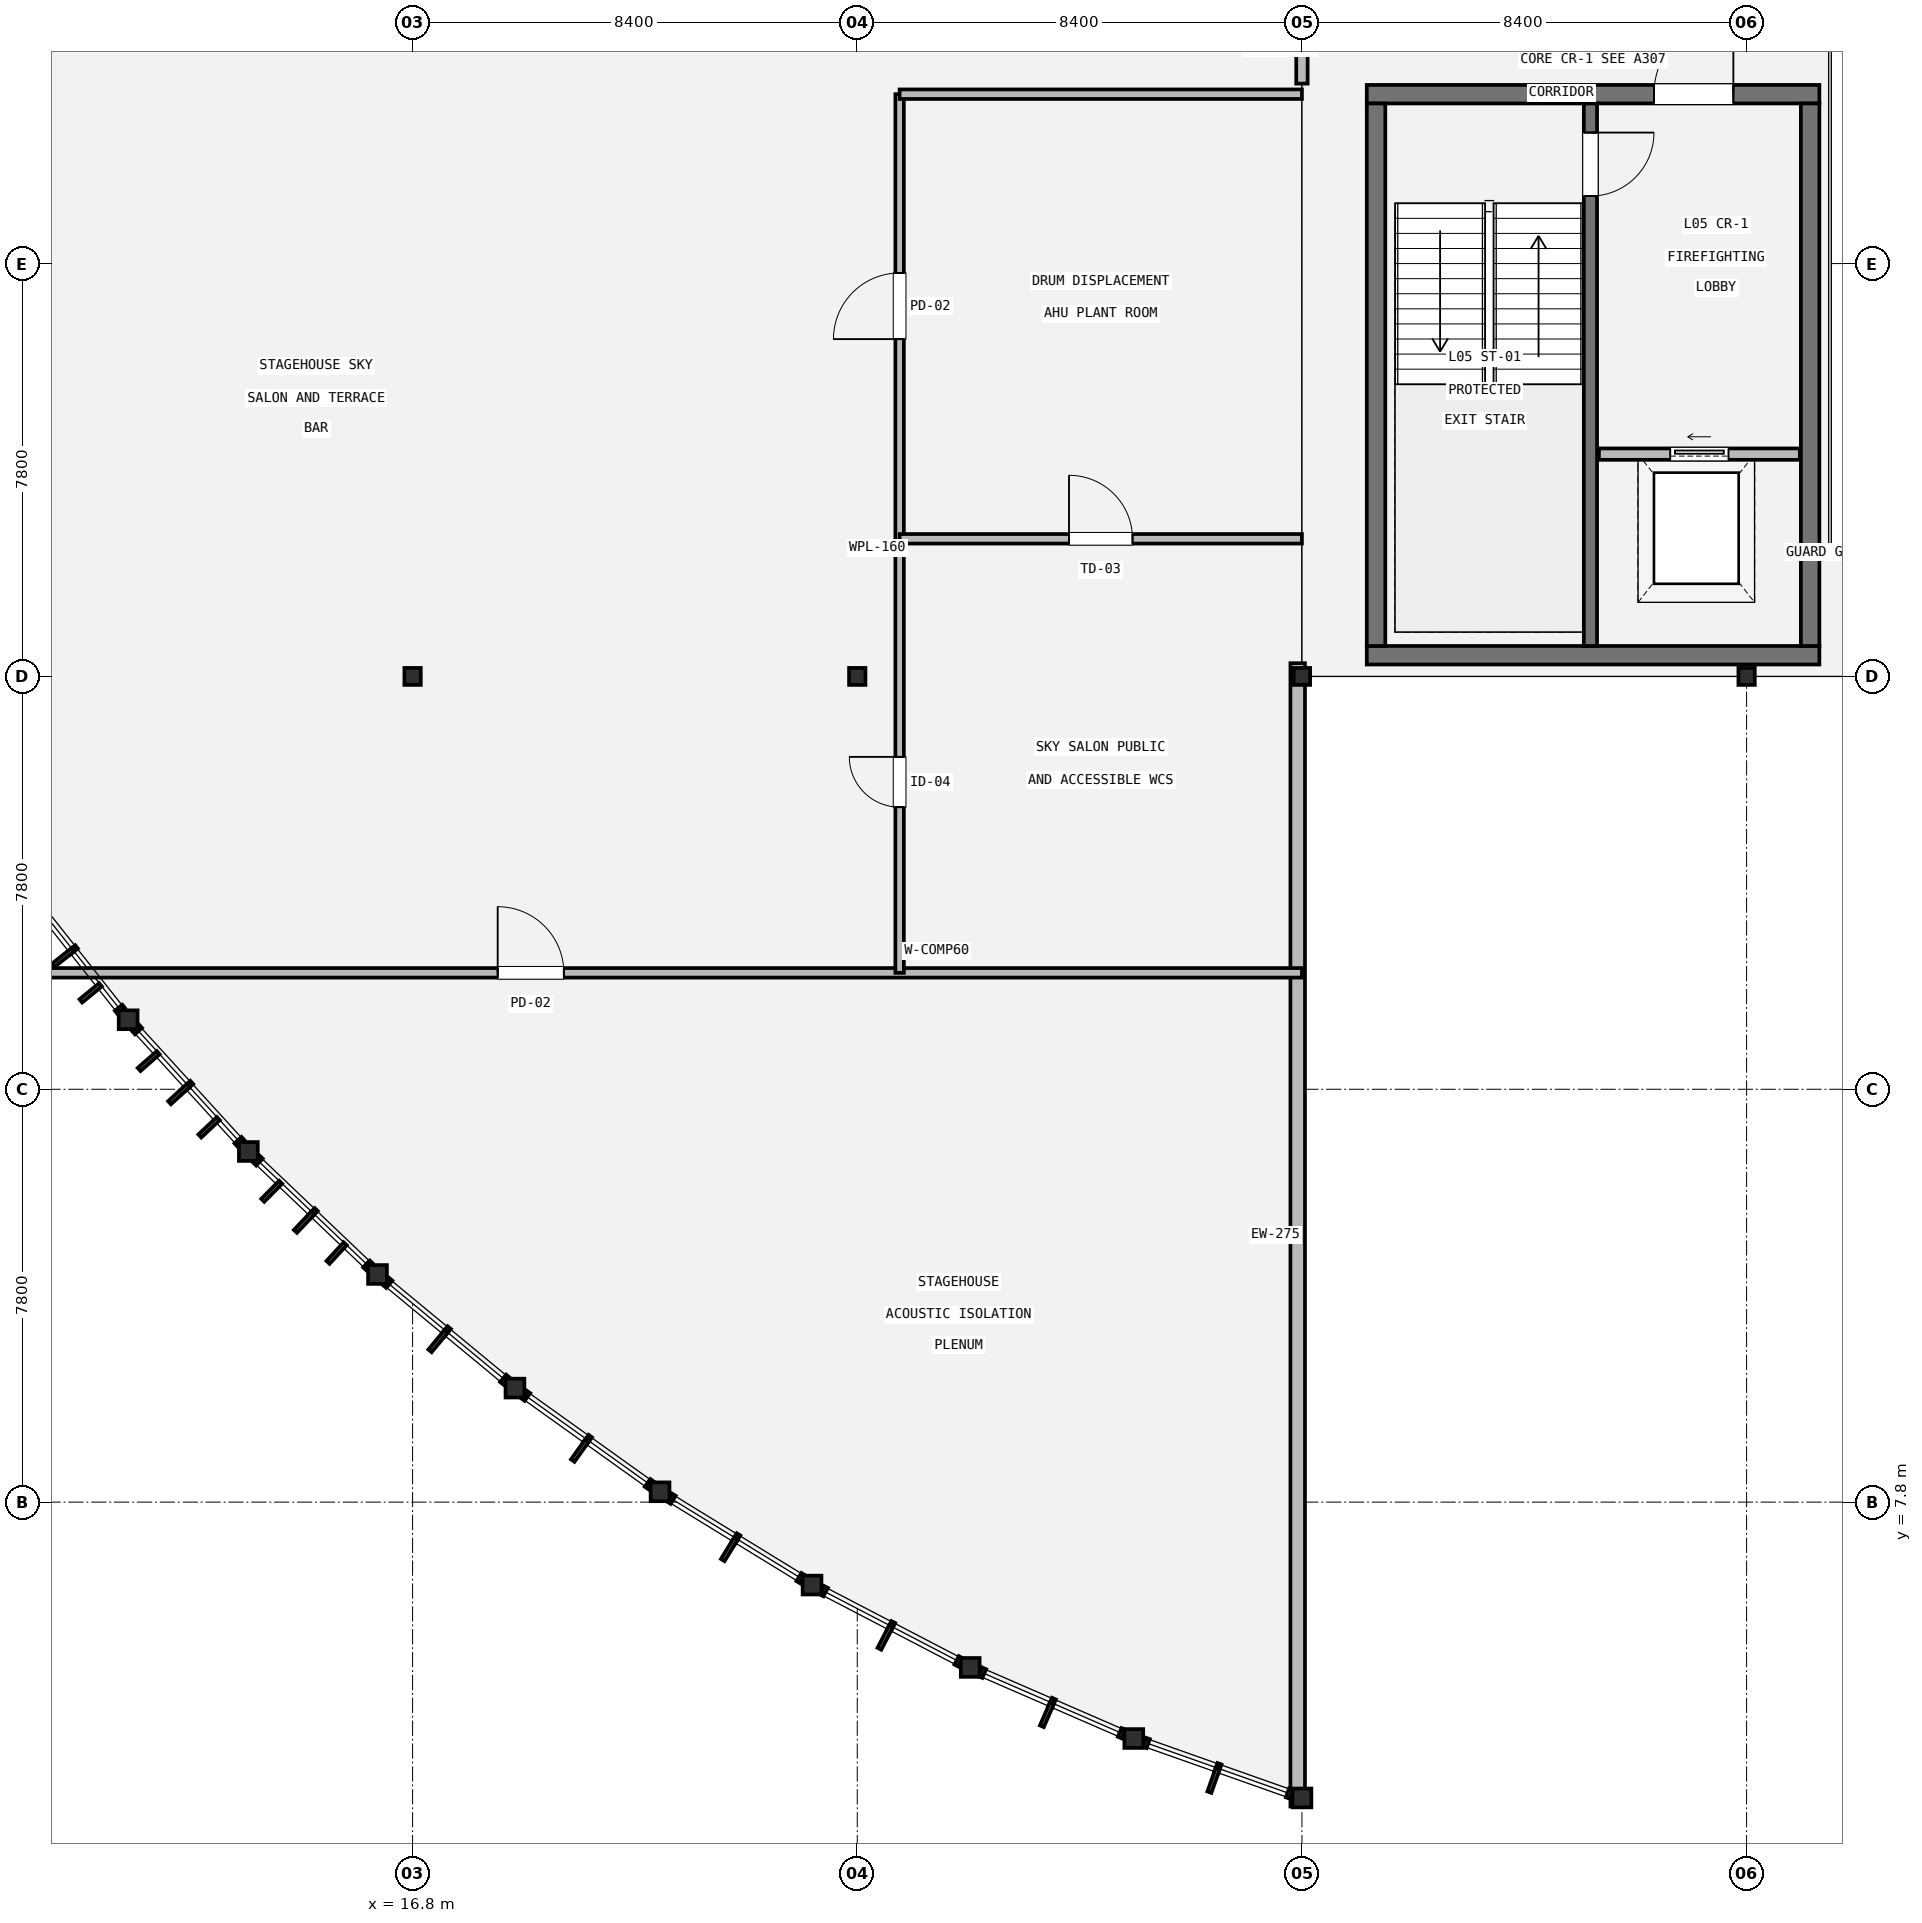
"""IFC4 building model, lengths in metres.
Left out: names, types, materials, properties, quantities, classifications, styles, units other than length and angle.
Written with IfcOpenShell. Run it as: python <this file> out.ifc"""

import sys

from ifc_helpers import new_model, si_unit, direction, frame, frame_2d, origin, origin_2d, place, context, subcontext, project, spatial, rectangle, hollow_circle, i_section, extrude, element, fill, save


model = new_model("IFC4")
c1 = context("Model", 3, precision=1e-05, world=origin(), true_north=direction((0.0, 1.0)))
c2 = subcontext(c1, "Body", "Model", "MODEL_VIEW")
j1 = project(units=[si_unit("LENGTHUNIT", "METRE"), si_unit("PLANEANGLEUNIT", "RADIAN")], contexts=[c1])
p1 = place(None, origin())
s1 = spatial("IfcSite", under=j1, at=p1, CompositionType="ELEMENT")
p2 = place(p1, origin())
s2 = spatial("IfcBuilding", under=s1, at=p2, CompositionType="ELEMENT")
p3 = place(p2, frame((0.0, 0.0, 23.4)))
s3 = spatial("IfcBuildingStorey", under=s2, at=p3, CompositionType="ELEMENT", Elevation=23.4)
for number, where, z_axis, x_axis in (
    (1, (16.8, 23.4, 0.0), (0.0, 0.0, 1.0), (1.0, 0.0, 0.0)),
    (2, (25.2, 23.4, 0.0), (0.0, 0.0, 1.0), (1.0, 0.0, 0.0)),
    (3, (33.6, 23.4, 0.0), (0.0, 0.0, 1.0), (1.0, 0.0, 0.0)),
    (4, (42.0, 23.4, 0.0), (0.0, 0.0, 1.0), (1.0, 0.0, 0.0)),
):
    element("IfcColumn", number, at=place(p3, frame(where, z_axis=z_axis, x_axis=x_axis)), inside=s3, PredefinedType="COLUMN", context=c2, shape_type="SweptSolid", body=[
        extrude(i_section(OverallWidth=0.309, OverallDepth=0.321, WebThickness=0.014, FlangeThickness=0.022, FilletRadius=0.015, at=origin_2d()), origin(), (0.0, 0.0, 1.0), 4.2),
    ])
for number, where, z_axis, x_axis in (
    (5, (11.427, 16.913, 0.0), (0.0, 0.0, 1.0), (1.0, 0.0, 0.0)),
    (6, (13.698, 14.424, 0.0), (0.0, 0.0, 1.0), (1.0, 0.0, 0.0)),
    (7, (16.137, 12.101, 0.0), (0.0, 0.0, 1.0), (1.0, 0.0, 0.0)),
    (8, (18.734, 9.954, 0.0), (0.0, 0.0, 1.0), (1.0, 0.0, 0.0)),
    (9, (21.474, 7.995, 0.0), (0.0, 0.0, 1.0), (1.0, 0.0, 0.0)),
    (10, (24.346, 6.233, 0.0), (0.0, 0.0, 1.0), (1.0, 0.0, 0.0)),
    (11, (27.334, 4.677, 0.0), (0.0, 0.0, 1.0), (1.0, 0.0, 0.0)),
    (12, (30.424, 3.334, 0.0), (0.0, 0.0, 1.0), (1.0, 0.0, 0.0)),
    (13, (33.6, 2.211, 0.0), (0.0, 0.0, 1.0), (1.0, 0.0, 0.0)),
):
    element("IfcColumn", number, at=place(p3, frame(where, z_axis=z_axis, x_axis=x_axis)), inside=s3, PredefinedType="COLUMN", context=c2, shape_type="SweptSolid", body=[
        extrude(hollow_circle(Radius=0.178, WallThickness=0.016, at=origin_2d()), origin(), (0.0, 0.0, 1.0), 4.2),
    ])
p4 = place(p3, frame((33.52, 2.05, 0.0), z_axis=(0.0, 0.0, 1.0), x_axis=(0.0, 1.0, 0.0)))
e14 = element("IfcWall", 14, at=p4, inside=s3, PredefinedType="STANDARD", context=c2, shape_type="SweptSolid", body=[
    extrude(rectangle(XDim=21.6, YDim=0.275, at=frame_2d((10.8, 0.0))), origin(), (0.0, 0.0, 1.0), 3.177),
])
p5 = place(p3, frame((43.375, 23.8, 0.0), z_axis=(0.0, 0.0, 1.0), x_axis=(-1.0, 0.0, 0.0)))
e15 = element("IfcWall", 15, at=p5, inside=s3, PredefinedType="SHEAR", context=c2, shape_type="SweptSolid", body=[
    extrude(rectangle(XDim=8.55, YDim=0.35, at=frame_2d((4.275, 0.0))), origin(), (0.0, 0.0, 1.0), 3.955),
])
p6 = place(p3, frame((34.825, 34.4, 0.0), z_axis=(0.0, 0.0, 1.0), x_axis=(1.0, 0.0, 0.0)))
e16 = element("IfcWall", 16, at=p6, inside=s3, PredefinedType="SHEAR", context=c2, shape_type="SweptSolid", body=[
    extrude(rectangle(XDim=8.55, YDim=0.35, at=frame_2d((4.275, 0.0))), origin(), (0.0, 0.0, 1.0), 3.955),
])
p7 = place(p6, frame((5.425, 0.0, 0.0)))
e17 = element("IfcOpeningElement", 17, at=p7, cuts=e16, PredefinedType="OPENING", context=c2, shape_type="SweptSolid", body=[
    extrude(rectangle(XDim=1.5, YDim=2.15, at=frame_2d((0.75, 1.075))), frame((0.0, 0.185, 0.0), z_axis=(0.0, -1.0, 0.0), x_axis=(1.0, 0.0, 0.0)), (0.0, 0.0, 1.0), 0.37),
])
for number, where, z_axis, x_axis in (
    (18, (35.0, 23.975, 0.0), (0.0, 0.0, 1.0), (0.0, 1.0, 0.0)),
    (19, (43.2, 34.225, 0.0), (0.0, 0.0, 1.0), (0.0, -1.0, 0.0)),
):
    element("IfcWall", number, at=place(p3, frame(where, z_axis=z_axis, x_axis=x_axis)), inside=s3, PredefinedType="SHEAR", context=c2, shape_type="SweptSolid", body=[
        extrude(rectangle(XDim=10.25, YDim=0.35, at=frame_2d((5.125, 0.0))), origin(), (0.0, 0.0, 1.0), 3.955),
    ])
p8 = place(p3, frame((39.05, 34.225, 0.0), z_axis=(0.0, 0.0, 1.0), x_axis=(0.0, -1.0, 0.0)))
e20 = element("IfcWall", 20, at=p8, inside=s3, PredefinedType="SHEAR", context=c2, shape_type="SweptSolid", body=[
    extrude(rectangle(XDim=10.25, YDim=0.25, at=frame_2d((5.125, 0.0))), origin(), (0.0, 0.0, 1.0), 3.955),
])
p9 = place(p8, frame((0.55, 0.0, 0.0)))
e21 = element("IfcOpeningElement", 21, at=p9, cuts=e20, PredefinedType="OPENING", context=c2, shape_type="SweptSolid", body=[
    extrude(rectangle(XDim=1.2, YDim=2.15, at=frame_2d((0.6, 1.075))), frame((0.0, 0.135, 0.0), z_axis=(0.0, -1.0, 0.0), x_axis=(1.0, 0.0, 0.0)), (0.0, 0.0, 1.0), 0.27),
])
p10 = place(p3, frame((39.21, 27.6, 0.0), z_axis=(0.0, 0.0, 1.0), x_axis=(1.0, 0.0, 0.0)))
e22 = element("IfcWall", 22, at=p10, inside=s3, PredefinedType="STANDARD", context=c2, shape_type="SweptSolid", body=[
    extrude(rectangle(XDim=3.795, YDim=0.215, at=frame_2d((1.897, 0.0))), origin(), (0.0, 0.0, 1.0), 3.947),
])
p11 = place(p10, frame((1.347, 0.0, 0.0)))
e23 = element("IfcOpeningElement", 23, at=p11, cuts=e22, PredefinedType="OPENING", context=c2, shape_type="SweptSolid", body=[
    extrude(rectangle(XDim=1.1, YDim=2.2, at=frame_2d((0.55, 1.1))), frame((0.0, 0.117, 0.0), z_axis=(0.0, -1.0, 0.0), x_axis=(1.0, 0.0, 0.0)), (0.0, 0.0, 1.0), 0.235),
])
p12 = place(p3, frame((7.0, 17.8, 0.0), z_axis=(0.0, 0.0, 1.0), x_axis=(1.0, 0.0, 0.0)))
e24 = element("IfcWall", 24, at=p12, inside=s3, PredefinedType="STANDARD", context=c2, shape_type="SweptSolid", body=[
    extrude(rectangle(XDim=26.6, YDim=0.18, at=frame_2d((13.3, 0.0))), origin(), (0.0, 0.0, 1.0), 3.667),
])
p13 = place(p12, frame((11.407, 0.0, 0.0)))
e25 = element("IfcOpeningElement", 25, at=p13, cuts=e24, PredefinedType="OPENING", context=c2, shape_type="SweptSolid", body=[
    extrude(rectangle(XDim=1.25, YDim=2.15, at=frame_2d((0.625, 1.075))), frame((0.0, 0.1, 0.0), z_axis=(0.0, -1.0, 0.0), x_axis=(1.0, 0.0, 0.0)), (0.0, 0.0, 1.0), 0.2),
])
p14 = place(p3, frame((33.6, 34.6, 0.0), z_axis=(0.0, 0.0, 1.0), x_axis=(0.0, 1.0, 0.0)))
e26 = element("IfcWall", 26, at=p14, inside=s3, PredefinedType="STANDARD", context=c2, shape_type="SweptSolid", body=[
    extrude(rectangle(XDim=20.0, YDim=0.215, at=frame_2d((10.0, 0.0))), origin(), (0.0, 0.0, 1.0), 3.177),
])
p15 = place(p14, frame((1.504, 0.0, 0.0)))
e27 = element("IfcOpeningElement", 27, at=p15, cuts=e26, PredefinedType="OPENING", context=c2, shape_type="SweptSolid", body=[
    extrude(rectangle(XDim=1.2, YDim=2.15, at=frame_2d((0.6, 1.075))), frame((0.0, 0.117, 0.0), z_axis=(0.0, -1.0, 0.0), x_axis=(1.0, 0.0, 0.0)), (0.0, 0.0, 1.0), 0.235),
])
p16 = place(p14, frame((13.724, 0.0, 0.0)))
e28 = element("IfcOpeningElement", 28, at=p16, cuts=e26, PredefinedType="OPENING", context=c2, shape_type="SweptSolid", body=[
    extrude(rectangle(XDim=1.2, YDim=2.15, at=frame_2d((0.6, 1.075))), frame((0.0, 0.117, 0.0), z_axis=(0.0, -1.0, 0.0), x_axis=(1.0, 0.0, 0.0)), (0.0, 0.0, 1.0), 0.235),
])
p17 = place(p3, frame((26.0, 17.8, 0.0), z_axis=(0.0, 0.0, 1.0), x_axis=(0.0, 1.0, 0.0)))
e29 = element("IfcWall", 29, at=p17, inside=s3, PredefinedType="PLUMBINGWALL", context=c2, shape_type="SweptSolid", body=[
    extrude(rectangle(XDim=16.6, YDim=0.16, at=frame_2d((8.3, 0.0))), origin(), (0.0, 0.0, 1.0), 3.434),
])
p18 = place(p17, frame((3.13, 0.0, 0.0)))
e30 = element("IfcOpeningElement", 30, at=p18, cuts=e29, PredefinedType="OPENING", context=c2, shape_type="SweptSolid", body=[
    extrude(rectangle(XDim=0.95, YDim=2.1, at=frame_2d((0.475, 1.05))), frame((0.0, 0.09, 0.0), z_axis=(0.0, -1.0, 0.0), x_axis=(1.0, 0.0, 0.0)), (0.0, 0.0, 1.0), 0.18),
])
p19 = place(p17, frame((11.973, 0.0, 0.0)))
e31 = element("IfcOpeningElement", 31, at=p19, cuts=e29, PredefinedType="OPENING", context=c2, shape_type="SweptSolid", body=[
    extrude(rectangle(XDim=1.25, YDim=2.15, at=frame_2d((0.625, 1.075))), frame((0.0, 0.09, 0.0), z_axis=(0.0, -1.0, 0.0), x_axis=(1.0, 0.0, 0.0)), (0.0, 0.0, 1.0), 0.18),
])
p20 = place(p3, frame((26.0, 26.0, 0.0), z_axis=(0.0, 0.0, 1.0), x_axis=(1.0, 0.0, 0.0)))
e32 = element("IfcWall", 32, at=p20, inside=s3, PredefinedType="STANDARD", context=c2, shape_type="SweptSolid", body=[
    extrude(rectangle(XDim=7.6, YDim=0.18, at=frame_2d((3.8, 0.0))), origin(), (0.0, 0.0, 1.0), 3.177),
])
p21 = place(p20, frame((3.2, 0.0, 0.0)))
e33 = element("IfcOpeningElement", 33, at=p21, cuts=e32, PredefinedType="OPENING", context=c2, shape_type="SweptSolid", body=[
    extrude(rectangle(XDim=1.2, YDim=1.1, at=frame_2d((0.6, 0.55))), frame((0.0, 0.1, 0.0), z_axis=(0.0, -1.0, 0.0), x_axis=(1.0, 0.0, 0.0)), (0.0, 0.0, 1.0), 0.2),
])
p22 = place(p3, frame((26.0, 34.4, 0.0), z_axis=(0.0, 0.0, 1.0), x_axis=(1.0, 0.0, 0.0)))
e34 = element("IfcWall", 34, at=p22, inside=s3, PredefinedType="STANDARD", context=c2, shape_type="SweptSolid", body=[
    extrude(rectangle(XDim=7.6, YDim=0.18, at=frame_2d((3.8, 0.0))), origin(), (0.0, 0.0, 1.0), 3.177),
])
p23 = place(p9, origin())
e35 = element("IfcDoor", 35, at=p23, inside=s3, OperationType="SINGLE_SWING_LEFT", PredefinedType="DOOR", context=c2, shape_type="SweptSolid", body=[
    extrude(rectangle(XDim=1.2, YDim=2.15, at=frame_2d((0.6, 1.075))), frame((0.0, 0.025, 0.0), z_axis=(0.0, -1.0, 0.0), x_axis=(1.0, 0.0, 0.0)), (0.0, 0.0, 1.0), 0.05),
])
fill(e21, e35)
p24 = place(p7, origin())
e36 = element("IfcDoor", 36, at=p24, inside=s3, OperationType="SINGLE_SWING_RIGHT", PredefinedType="DOOR", context=c2, shape_type="SweptSolid", body=[
    extrude(rectangle(XDim=1.5, YDim=2.15, at=frame_2d((0.75, 1.075))), frame((0.0, 0.025, 0.0), z_axis=(0.0, -1.0, 0.0), x_axis=(1.0, 0.0, 0.0)), (0.0, 0.0, 1.0), 0.05),
])
fill(e17, e36)
p25 = place(p11, origin())
e37 = element("IfcDoor", 37, at=p25, inside=s3, OperationType="SLIDING_TO_LEFT", PredefinedType="DOOR", context=c2, shape_type="SweptSolid", body=[
    extrude(rectangle(XDim=1.1, YDim=2.2, at=frame_2d((0.55, 1.1))), frame((0.0, 0.025, 0.0), z_axis=(0.0, -1.0, 0.0), x_axis=(1.0, 0.0, 0.0)), (0.0, 0.0, 1.0), 0.05),
])
fill(e23, e37)
p26 = place(p13, origin())
e38 = element("IfcDoor", 38, at=p26, inside=s3, OperationType="SINGLE_SWING_LEFT", PredefinedType="DOOR", context=c2, shape_type="SweptSolid", body=[
    extrude(rectangle(XDim=1.25, YDim=2.15, at=frame_2d((0.625, 1.075))), frame((0.0, 0.025, 0.0), z_axis=(0.0, -1.0, 0.0), x_axis=(1.0, 0.0, 0.0)), (0.0, 0.0, 1.0), 0.05),
])
fill(e25, e38)
p27 = place(p18, origin())
e39 = element("IfcDoor", 39, at=p27, inside=s3, OperationType="SINGLE_SWING_RIGHT", PredefinedType="DOOR", context=c2, shape_type="SweptSolid", body=[
    extrude(rectangle(XDim=0.95, YDim=2.1, at=frame_2d((0.475, 1.05))), frame((0.0, 0.025, 0.0), z_axis=(0.0, -1.0, 0.0), x_axis=(1.0, 0.0, 0.0)), (0.0, 0.0, 1.0), 0.05),
])
fill(e30, e39)
p28 = place(p19, origin())
e40 = element("IfcDoor", 40, at=p28, inside=s3, OperationType="SINGLE_SWING_LEFT", PredefinedType="DOOR", context=c2, shape_type="SweptSolid", body=[
    extrude(rectangle(XDim=1.25, YDim=2.15, at=frame_2d((0.625, 1.075))), frame((0.0, 0.025, 0.0), z_axis=(0.0, -1.0, 0.0), x_axis=(1.0, 0.0, 0.0)), (0.0, 0.0, 1.0), 0.05),
])
fill(e31, e40)
p29 = place(p21, origin())
e41 = element("IfcDoor", 41, at=p29, inside=s3, OperationType="SWING_FIXED_LEFT", PredefinedType="TRAPDOOR", context=c2, shape_type="SweptSolid", body=[
    extrude(rectangle(XDim=1.2, YDim=1.1, at=frame_2d((0.6, 0.55))), frame((0.0, 0.025, 0.0), z_axis=(0.0, -1.0, 0.0), x_axis=(1.0, 0.0, 0.0)), (0.0, 0.0, 1.0), 0.05),
])
fill(e33, e41)
save(model, sys.argv[1])
